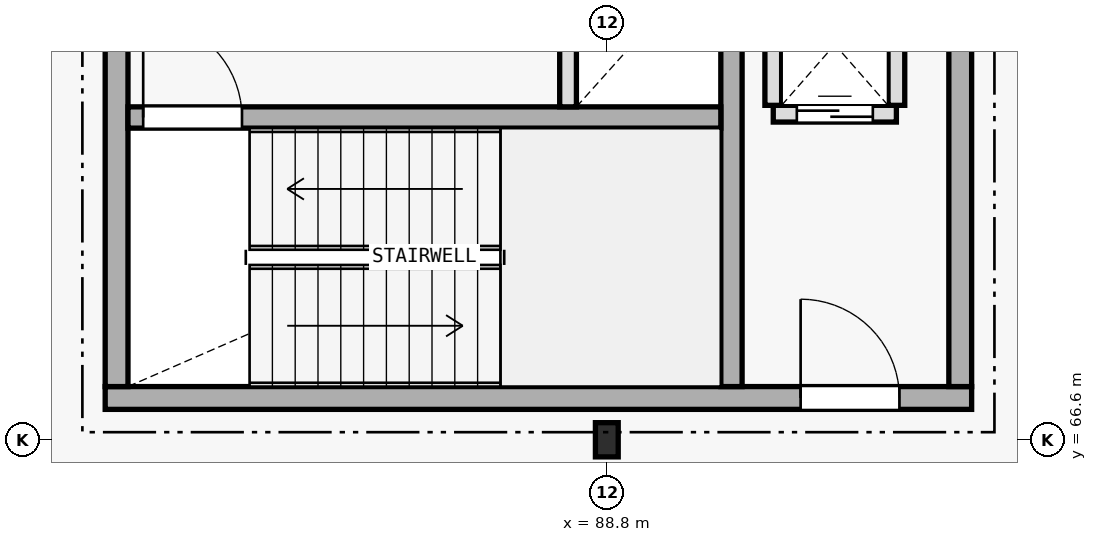
"""IFC4 building model, lengths in metres.
Left out: names, types, materials, properties, quantities, classifications, styles, units other than length and angle.
Written with IfcOpenShell. Run it as: python <this file> out.ifc"""

import sys

from ifc_helpers import new_model, si_unit, direction, frame, frame_2d, origin, origin_2d, place, context, subcontext, project, spatial, rectangle, i_section, extrude, element, fill, save


model = new_model("IFC4")
c1 = context("Model", 3, precision=1e-05, world=origin(), true_north=direction((0.0, 1.0)))
c2 = subcontext(c1, "Body", "Model", "MODEL_VIEW")
j1 = project(units=[si_unit("LENGTHUNIT", "METRE"), si_unit("PLANEANGLEUNIT", "RADIAN")], contexts=[c1])
p1 = place(None, origin())
s1 = spatial("IfcSite", under=j1, at=p1, CompositionType="ELEMENT")
p2 = place(p1, origin())
s2 = spatial("IfcBuilding", under=s1, at=p2, CompositionType="ELEMENT")
p3 = place(p2, frame((0.0, 0.0, 9.9)))
s3 = spatial("IfcBuildingStorey", under=s2, at=p3, CompositionType="ELEMENT", Elevation=9.9)
p4 = place(p3, frame((82.2, 67.15, 0.0), z_axis=(0.0, 0.0, 1.0), x_axis=(1.0, 0.0, 0.0)))
e1 = element("IfcWall", 1, at=p4, inside=s3, PredefinedType="SHEAR", context=c2, shape_type="SweptSolid", body=[
    extrude(rectangle(XDim=11.4, YDim=0.3, at=frame_2d((5.7, 0.0))), origin(), (0.0, 0.0, 1.0), 4.195),
])
p5 = place(p4, frame((9.15, 0.0, 0.0)))
e2 = element("IfcOpeningElement", 2, at=p5, cuts=e1, PredefinedType="OPENING", context=c2, shape_type="SweptSolid", body=[
    extrude(rectangle(XDim=1.3, YDim=2.2, at=frame_2d((0.65, 1.1))), frame((0.0, 0.16, 0.0), z_axis=(0.0, -1.0, 0.0), x_axis=(1.0, 0.0, 0.0)), (0.0, 0.0, 1.0), 0.32),
])
for number, where, z_axis, x_axis in (
    (3, (82.35, 67.3, 0.0), (0.0, 0.0, 1.0), (0.0, 1.0, 0.0)),
    (4, (93.45, 67.3, 0.0), (0.0, 0.0, 1.0), (0.0, 1.0, 0.0)),
):
    element("IfcWall", number, at=place(p3, frame(where, z_axis=z_axis, x_axis=x_axis)), inside=s3, PredefinedType="SHEAR", context=c2, shape_type="SweptSolid", body=[
        extrude(rectangle(XDim=5.8, YDim=0.3, at=frame_2d((2.9, 0.0))), origin(), (0.0, 0.0, 1.0), 4.195),
    ])
p6 = place(p3, frame((90.44, 67.3, 0.0), z_axis=(0.0, 0.0, 1.0), x_axis=(0.0, 1.0, 0.0)))
e5 = element("IfcWall", 5, at=p6, inside=s3, PredefinedType="SHEAR", context=c2, shape_type="SweptSolid", body=[
    extrude(rectangle(XDim=5.8, YDim=0.28, at=frame_2d((2.9, 0.0))), origin(), (0.0, 0.0, 1.0), 4.195),
])
p7 = place(p3, frame((82.5, 70.84, 0.0), z_axis=(0.0, 0.0, 1.0), x_axis=(1.0, 0.0, 0.0)))
e6 = element("IfcWall", 6, at=p7, inside=s3, PredefinedType="SHEAR", context=c2, shape_type="SweptSolid", body=[
    extrude(rectangle(XDim=7.8, YDim=0.28, at=frame_2d((3.9, 0.0))), origin(), (0.0, 0.0, 1.0), 4.195),
])
p8 = place(p7, frame((0.2, 0.0, 0.0)))
e7 = element("IfcOpeningElement", 7, at=p8, cuts=e6, PredefinedType="OPENING", context=c2, shape_type="SweptSolid", body=[
    extrude(rectangle(XDim=1.3, YDim=2.2, at=frame_2d((0.65, 1.1))), frame((0.0, 0.15, 0.0), z_axis=(0.0, -1.0, 0.0), x_axis=(1.0, 0.0, 0.0)), (0.0, 0.0, 1.0), 0.3),
])
p9 = place(p3, frame((88.8, 66.6, 0.0), z_axis=(0.0, 0.0, 1.0), x_axis=(1.0, 0.0, 0.0)))
e8 = element("IfcColumn", 8, at=p9, inside=s3, PredefinedType="COLUMN", context=c2, shape_type="SweptSolid", body=[
    extrude(i_section(OverallWidth=0.3, OverallDepth=0.45, WebThickness=0.014, FlangeThickness=0.026, FilletRadius=0.027, at=origin_2d()), origin(), (0.0, 0.0, 1.0), 4.2),
])
p10 = place(p3, frame((90.99, 70.89, 0.0), z_axis=(0.0, 0.0, 1.0), x_axis=(1.0, 0.0, 0.0)))
e9 = element("IfcWall", 9, at=p10, inside=s3, PredefinedType="PLUMBINGWALL", context=c2, shape_type="SweptSolid", body=[
    extrude(rectangle(XDim=1.62, YDim=0.22, at=frame_2d((0.81, 0.0))), origin(), (0.0, 0.0, 1.0), 3.92),
])
p11 = place(p10, frame((0.31, 0.0, 0.0)))
e10 = element("IfcOpeningElement", 10, at=p11, cuts=e9, PredefinedType="OPENING", context=c2, shape_type="SweptSolid", body=[
    extrude(rectangle(XDim=1.0, YDim=2.2, at=frame_2d((0.5, 1.1))), frame((0.0, 0.12, 0.0), z_axis=(0.0, -1.0, 0.0), x_axis=(1.0, 0.0, 0.0)), (0.0, 0.0, 1.0), 0.24),
])
for number, where, z_axis, x_axis in (
    (11, (90.99, 71.0, 0.0), (0.0, 0.0, 1.0), (0.0, 1.0, 0.0)),
    (12, (92.61, 71.0, 0.0), (0.0, 0.0, 1.0), (0.0, 1.0, 0.0)),
):
    element("IfcWall", number, at=place(p3, frame(where, z_axis=z_axis, x_axis=x_axis)), inside=s3, PredefinedType="PLUMBINGWALL", context=c2, shape_type="SweptSolid", body=[
        extrude(rectangle(XDim=1.6, YDim=0.22, at=frame_2d((0.8, 0.0))), origin(), (0.0, 0.0, 1.0), 3.92),
    ])
p12 = place(p3, frame((88.29, 70.98, 0.0), z_axis=(0.0, 0.0, 1.0), x_axis=(0.0, 1.0, 0.0)))
e13 = element("IfcWall", 13, at=p12, inside=s3, PredefinedType="PLUMBINGWALL", context=c2, shape_type="SweptSolid", body=[
    extrude(rectangle(XDim=2.12, YDim=0.22, at=frame_2d((1.06, 0.0))), origin(), (0.0, 0.0, 1.0), 3.92),
])
p13 = place(p8, origin())
e14 = element("IfcDoor", 14, at=p13, inside=s3, OperationType="SINGLE_SWING_LEFT", PredefinedType="DOOR", context=c2, shape_type="SweptSolid", body=[
    extrude(rectangle(XDim=1.3, YDim=2.2, at=frame_2d((0.65, 1.1))), frame((0.0, 0.025, 0.0), z_axis=(0.0, -1.0, 0.0), x_axis=(1.0, 0.0, 0.0)), (0.0, 0.0, 1.0), 0.05),
])
fill(e7, e14)
p14 = place(p11, origin())
e15 = element("IfcDoor", 15, at=p14, inside=s3, OperationType="DOUBLE_DOOR_SLIDING", PredefinedType="DOOR", context=c2, shape_type="SweptSolid", body=[
    extrude(rectangle(XDim=1.0, YDim=2.2, at=frame_2d((0.5, 1.1))), frame((0.0, 0.025, 0.0), z_axis=(0.0, -1.0, 0.0), x_axis=(1.0, 0.0, 0.0)), (0.0, 0.0, 1.0), 0.05),
])
fill(e10, e15)
p15 = place(p5, origin())
e16 = element("IfcDoor", 16, at=p15, inside=s3, OperationType="SINGLE_SWING_LEFT", PredefinedType="DOOR", context=c2, shape_type="SweptSolid", body=[
    extrude(rectangle(XDim=1.3, YDim=2.2, at=frame_2d((0.65, 1.1))), frame((0.0, 0.025, 0.0), z_axis=(0.0, -1.0, 0.0), x_axis=(1.0, 0.0, 0.0)), (0.0, 0.0, 1.0), 0.05),
])
fill(e2, e16)
save(model, sys.argv[1])
